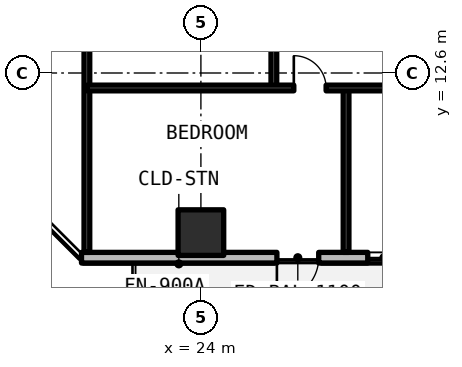
"""IFC4 building model, lengths in metres.
Left out: names, types, materials, properties, quantities, classifications, styles, units other than length and angle.
Written with IfcOpenShell. Run it as: python <this file> out.ifc"""

import sys

from ifc_helpers import new_model, si_unit, direction, frame, frame_2d, origin, origin_2d, place, context, subcontext, project, spatial, rectangle, extrude, element, fill, save


model = new_model("IFC4")
c1 = context("Model", 3, precision=1e-05, world=origin(), true_north=direction((0.0, 1.0)))
c2 = subcontext(c1, "Body", "Model", "MODEL_VIEW")
j1 = project(units=[si_unit("LENGTHUNIT", "METRE"), si_unit("PLANEANGLEUNIT", "RADIAN")], contexts=[c1])
p1 = place(None, origin())
s1 = spatial("IfcSite", under=j1, at=p1, CompositionType="ELEMENT")
p2 = place(p1, origin())
s2 = spatial("IfcBuilding", under=s1, at=p2, CompositionType="ELEMENT")
p3 = place(p2, frame((0.0, 0.0, 35.64)))
s3 = spatial("IfcBuildingStorey", under=s2, at=p3, CompositionType="ELEMENT", Elevation=35.64)
p4 = place(p3, frame((24.0, 8.4, 0.0), z_axis=(0.0, 0.0, 1.0), x_axis=(1.0, 0.0, 0.0)))
e1 = element("IfcColumn", 1, at=p4, inside=s3, PredefinedType="COLUMN", context=c2, shape_type="SweptSolid", body=[
    extrude(rectangle(XDim=1.2, YDim=1.2, at=origin_2d()), origin(), (0.0, 0.0, 1.0), 3.3),
])
p5 = place(p3, frame((20.858, 7.74, 0.0), z_axis=(0.0, 0.0, 1.0), x_axis=(1.0, 0.0, 0.0)))
e2 = element("IfcWall", 2, at=p5, inside=s3, PredefinedType="SOLIDWALL", context=c2, shape_type="SweptSolid", body=[
    extrude(rectangle(XDim=22.602, YDim=0.28, at=frame_2d((11.301, 0.0))), origin(), (0.0, 0.0, 1.0), 3.08),
])
p6 = place(p5, frame((5.142, 0.0, 0.0)))
e3 = element("IfcOpeningElement", 3, at=p6, cuts=e2, PredefinedType="OPENING", context=c2, shape_type="SweptSolid", body=[
    extrude(rectangle(XDim=1.1, YDim=2.15, at=frame_2d((0.55, 1.075))), frame((0.0, 0.15, 0.0), z_axis=(0.0, -1.0, 0.0), x_axis=(1.0, 0.0, 0.0)), (0.0, 0.0, 1.0), 0.3),
])
p7 = place(p5, frame((7.533, 0.0, 0.78)))
e4 = element("IfcOpeningElement", 4, at=p7, cuts=e2, PredefinedType="OPENING", context=c2, shape_type="SweptSolid", body=[
    extrude(rectangle(XDim=0.85, YDim=1.65, at=frame_2d((0.425, 0.825))), frame((0.0, 0.15, 0.0), z_axis=(0.0, -1.0, 0.0), x_axis=(1.0, 0.0, 0.0)), (0.0, 0.0, 1.0), 0.3),
])
p8 = place(p5, frame((11.458, 0.0, 0.78)))
e5 = element("IfcOpeningElement", 5, at=p8, cuts=e2, PredefinedType="OPENING", context=c2, shape_type="SweptSolid", body=[
    extrude(rectangle(XDim=0.85, YDim=1.65, at=frame_2d((0.425, 0.825))), frame((0.0, 0.15, 0.0), z_axis=(0.0, -1.0, 0.0), x_axis=(1.0, 0.0, 0.0)), (0.0, 0.0, 1.0), 0.3),
])
p9 = place(p5, frame((13.519, 0.0, 0.78)))
e6 = element("IfcOpeningElement", 6, at=p9, cuts=e2, PredefinedType="OPENING", context=c2, shape_type="SweptSolid", body=[
    extrude(rectangle(XDim=0.85, YDim=1.65, at=frame_2d((0.425, 0.825))), frame((0.0, 0.15, 0.0), z_axis=(0.0, -1.0, 0.0), x_axis=(1.0, 0.0, 0.0)), (0.0, 0.0, 1.0), 0.3),
])
p10 = place(p5, frame((17.254, 0.0, 0.78)))
e7 = element("IfcOpeningElement", 7, at=p10, cuts=e2, PredefinedType="OPENING", context=c2, shape_type="SweptSolid", body=[
    extrude(rectangle(XDim=0.85, YDim=1.65, at=frame_2d((0.425, 0.825))), frame((0.0, 0.15, 0.0), z_axis=(0.0, -1.0, 0.0), x_axis=(1.0, 0.0, 0.0)), (0.0, 0.0, 1.0), 0.3),
])
p11 = place(p5, frame((19.418, 0.0, 0.78)))
e8 = element("IfcOpeningElement", 8, at=p11, cuts=e2, PredefinedType="OPENING", context=c2, shape_type="SweptSolid", body=[
    extrude(rectangle(XDim=0.85, YDim=1.65, at=frame_2d((0.425, 0.825))), frame((0.0, 0.15, 0.0), z_axis=(0.0, -1.0, 0.0), x_axis=(1.0, 0.0, 0.0)), (0.0, 0.0, 1.0), 0.3),
])
p12 = place(p3, frame((21.0, 7.88, 0.0), z_axis=(0.0, 0.0, 1.0), x_axis=(0.0, 1.0, 0.0)))
e9 = element("IfcWall", 9, at=p12, inside=s3, PredefinedType="SOLIDWALL", context=c2, shape_type="SweptSolid", body=[
    extrude(rectangle(XDim=14.17, YDim=0.15, at=frame_2d((7.085, 0.0))), origin(), (0.0, 0.0, 1.0), 2.35),
])
p13 = place(p3, frame((25.92, 12.206, 0.0), z_axis=(0.0, 0.0, 1.0), x_axis=(0.0, 1.0, 0.0)))
e10 = element("IfcWall", 10, at=p13, inside=s3, PredefinedType="PARTITIONING", context=c2, shape_type="SweptSolid", body=[
    extrude(rectangle(XDim=9.844, YDim=0.15, at=frame_2d((4.922, 0.0))), origin(), (0.0, 0.0, 1.0), 2.35),
])
p14 = place(p13, frame((1.593, 0.0, 0.0)))
e11 = element("IfcOpeningElement", 11, at=p14, cuts=e10, PredefinedType="OPENING", context=c2, shape_type="SweptSolid", body=[
    extrude(rectangle(XDim=0.85, YDim=2.1, at=frame_2d((0.425, 1.05))), frame((0.0, 0.085, 0.0), z_axis=(0.0, -1.0, 0.0), x_axis=(1.0, 0.0, 0.0)), (0.0, 0.0, 1.0), 0.17),
])
p15 = place(p13, frame((6.515, 0.0, 0.0)))
e12 = element("IfcOpeningElement", 12, at=p15, cuts=e10, PredefinedType="OPENING", context=c2, shape_type="SweptSolid", body=[
    extrude(rectangle(XDim=0.85, YDim=2.1, at=frame_2d((0.425, 1.05))), frame((0.0, 0.085, 0.0), z_axis=(0.0, -1.0, 0.0), x_axis=(1.0, 0.0, 0.0)), (0.0, 0.0, 1.0), 0.17),
])
p16 = place(p3, frame((27.82, 7.88, 0.0), z_axis=(0.0, 0.0, 1.0), x_axis=(0.0, 1.0, 0.0)))
e13 = element("IfcWall", 13, at=p16, inside=s3, PredefinedType="PARTITIONING", context=c2, shape_type="SweptSolid", body=[
    extrude(rectangle(XDim=4.326, YDim=0.15, at=frame_2d((2.163, 0.0))), origin(), (0.0, 0.0, 1.0), 2.35),
])
p17 = place(p3, frame((21.0, 12.206, 0.0), z_axis=(0.0, 0.0, 1.0), x_axis=(1.0, 0.0, 0.0)))
e14 = element("IfcWall", 14, at=p17, inside=s3, PredefinedType="PARTITIONING", context=c2, shape_type="SweptSolid", body=[
    extrude(rectangle(XDim=10.751, YDim=0.15, at=frame_2d((5.375, 0.0))), origin(), (0.0, 0.0, 1.0), 2.35),
])
p18 = place(p17, frame((5.445, 0.0, 0.0)))
e15 = element("IfcOpeningElement", 15, at=p18, cuts=e14, PredefinedType="OPENING", context=c2, shape_type="SweptSolid", body=[
    extrude(rectangle(XDim=0.85, YDim=2.1, at=frame_2d((0.425, 1.05))), frame((0.0, 0.085, 0.0), z_axis=(0.0, -1.0, 0.0), x_axis=(1.0, 0.0, 0.0)), (0.0, 0.0, 1.0), 0.17),
])
p19 = place(p17, frame((8.361, 0.0, 0.0)))
e16 = element("IfcOpeningElement", 16, at=p19, cuts=e14, PredefinedType="OPENING", context=c2, shape_type="SweptSolid", body=[
    extrude(rectangle(XDim=0.85, YDim=2.1, at=frame_2d((0.425, 1.05))), frame((0.0, 0.085, 0.0), z_axis=(0.0, -1.0, 0.0), x_axis=(1.0, 0.0, 0.0)), (0.0, 0.0, 1.0), 0.17),
])
p20 = place(p6, frame((1.1, 0.0, 0.0), z_axis=(0.0, 0.0, 1.0), x_axis=(-1.0, 0.0, 0.0)))
e17 = element("IfcDoor", 17, at=p20, inside=s3, OperationType="SINGLE_SWING_RIGHT", PredefinedType="DOOR", context=c2, shape_type="SweptSolid", body=[
    extrude(rectangle(XDim=1.1, YDim=2.15, at=frame_2d((0.55, 1.075))), frame((0.0, 0.025, 0.0), z_axis=(0.0, -1.0, 0.0), x_axis=(1.0, 0.0, 0.0)), (0.0, 0.0, 1.0), 0.05),
])
fill(e3, e17)
p21 = place(p7, origin())
e18 = element("IfcWindow", 18, at=p21, inside=s3, PartitioningType="SINGLE_PANEL", PredefinedType="WINDOW", context=c2, shape_type="SweptSolid", body=[
    extrude(rectangle(XDim=0.85, YDim=1.65, at=frame_2d((0.425, 0.825))), frame((0.0, 0.03, 0.0), z_axis=(0.0, -1.0, 0.0), x_axis=(1.0, 0.0, 0.0)), (0.0, 0.0, 1.0), 0.06),
])
fill(e4, e18)
p22 = place(p18, origin())
e19 = element("IfcDoor", 19, at=p22, inside=s3, OperationType="SINGLE_SWING_LEFT", PredefinedType="DOOR", context=c2, shape_type="SweptSolid", body=[
    extrude(rectangle(XDim=0.85, YDim=2.1, at=frame_2d((0.425, 1.05))), frame((0.0, 0.025, 0.0), z_axis=(0.0, -1.0, 0.0), x_axis=(1.0, 0.0, 0.0)), (0.0, 0.0, 1.0), 0.05),
])
fill(e15, e19)
save(model, sys.argv[1])
